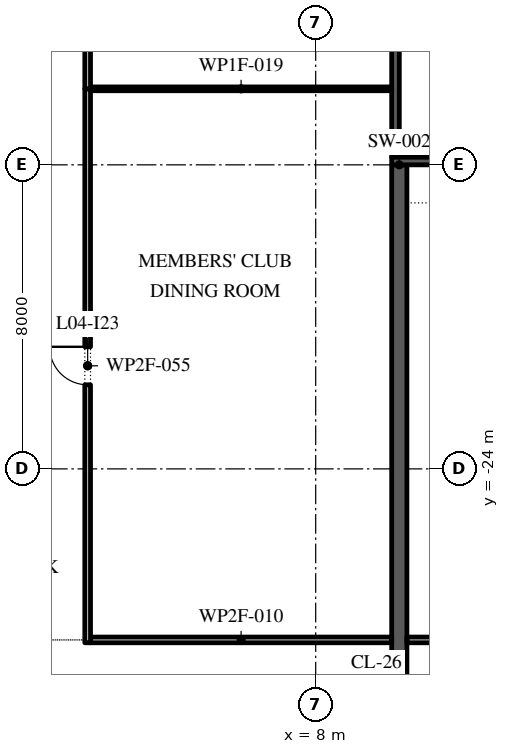
"""IFC4 building model, lengths in metres.
Left out: names, types, materials, properties, quantities, classifications, styles, units other than length and angle.
Written with IfcOpenShell. Run it as: python <this file> out.ifc"""

import sys

from ifc_helpers import new_model, si_unit, direction, frame, frame_2d, origin, place, context, subcontext, project, spatial, rectangle, extrude, element, fill, save


model = new_model("IFC4")
c1 = context("Model", 3, precision=1e-05, world=origin(), true_north=direction((0.0, 1.0)))
c2 = subcontext(c1, "Body", "Model", "MODEL_VIEW")
j1 = project(units=[si_unit("LENGTHUNIT", "METRE"), si_unit("PLANEANGLEUNIT", "RADIAN")], contexts=[c1])
p1 = place(None, origin())
s1 = spatial("IfcSite", under=j1, at=p1, CompositionType="ELEMENT")
p2 = place(p1, origin())
s2 = spatial("IfcBuilding", under=s1, at=p2, CompositionType="ELEMENT")
p3 = place(p2, frame((0.0, 0.0, 24.0)))
s3 = spatial("IfcBuildingStorey", under=s2, at=p3, CompositionType="ELEMENT", Elevation=24.0)
p4 = place(p3, frame((10.2, -31.0, 0.0), z_axis=(0.0, 0.0, 1.0), x_axis=(0.0, 1.0, 0.0)))
e1 = element("IfcWall", 1, at=p4, inside=s3, PredefinedType="SHEAR", context=c2, shape_type="SweptSolid", body=[
    extrude(rectangle(XDim=15.0, YDim=0.4, at=frame_2d((7.5, 0.0))), origin(), (0.0, 0.0, 1.0), 4.5),
])
p5 = place(p3, frame((10.1, -15.8, 0.0), z_axis=(0.0, 0.0, 1.0), x_axis=(0.0, 1.0, 0.0)))
e2 = element("IfcWall", 2, at=p5, inside=s3, PredefinedType="SHEAR", context=c2, shape_type="SweptSolid", body=[
    extrude(rectangle(XDim=13.05, YDim=0.2, at=frame_2d((6.525, 0.0))), origin(), (0.0, 0.0, 1.0), 4.5),
])
p6 = place(p5, frame((4.462, 0.0, 0.0)))
e3 = element("IfcOpeningElement", 3, at=p6, cuts=e2, PredefinedType="OPENING", context=c2, shape_type="SweptSolid", body=[
    extrude(rectangle(XDim=0.9, YDim=2.1, at=frame_2d((0.45, 1.05))), frame((0.0, 0.11, 0.0), z_axis=(0.0, -1.0, 0.0), x_axis=(1.0, 0.0, 0.0)), (0.0, 0.0, 1.0), 0.22),
])
p7 = place(p3, frame((10.0, -15.9, 0.0), z_axis=(0.0, 0.0, 1.0), x_axis=(1.0, 0.0, 0.0)))
e4 = element("IfcWall", 4, at=p7, inside=s3, PredefinedType="SHEAR", context=c2, shape_type="SweptSolid", body=[
    extrude(rectangle(XDim=12.0, YDim=0.2, at=frame_2d((6.0, 0.0))), origin(), (0.0, 0.0, 1.0), 4.5),
])
p8 = place(p3, frame((2.075, -28.5, 0.0), z_axis=(0.0, 0.0, 1.0), x_axis=(1.0, 0.0, 0.0)))
e5 = element("IfcWall", 5, at=p8, inside=s3, PredefinedType="PARTITIONING", context=c2, shape_type="SweptSolid", body=[
    extrude(rectangle(XDim=7.925, YDim=0.15, at=frame_2d((3.962, 0.0))), origin(), (0.0, 0.0, 1.0), 4.5),
])
p9 = place(p3, frame((10.4, -28.5, 0.0), z_axis=(0.0, 0.0, 1.0), x_axis=(1.0, 0.0, 0.0)))
e6 = element("IfcWall", 6, at=p9, inside=s3, PredefinedType="PARTITIONING", context=c2, shape_type="SweptSolid", body=[
    extrude(rectangle(XDim=11.525, YDim=0.15, at=frame_2d((5.763, 0.0))), origin(), (0.0, 0.0, 1.0), 4.5),
])
p10 = place(p3, frame((2.075, -14.0, 0.0), z_axis=(0.0, 0.0, 1.0), x_axis=(1.0, 0.0, 0.0)))
e7 = element("IfcWall", 7, at=p10, inside=s3, PredefinedType="PARTITIONING", context=c2, shape_type="SweptSolid", body=[
    extrude(rectangle(XDim=7.925, YDim=0.1, at=frame_2d((3.962, 0.0))), origin(), (0.0, 0.0, 1.0), 4.5),
])
p11 = place(p3, frame((2.0, -28.575, 0.0), z_axis=(0.0, 0.0, 1.0), x_axis=(0.0, 1.0, 0.0)))
e8 = element("IfcWall", 8, at=p11, inside=s3, PredefinedType="PARTITIONING", context=c2, shape_type="SweptSolid", body=[
    extrude(rectangle(XDim=14.575, YDim=0.15, at=frame_2d((7.288, 0.0))), origin(), (0.0, 0.0, 1.0), 4.5),
])
p12 = place(p11, frame((6.788, 0.0, 0.0)))
e9 = element("IfcOpeningElement", 9, at=p12, cuts=e8, PredefinedType="OPENING", context=c2, shape_type="SweptSolid", body=[
    extrude(rectangle(XDim=1.0, YDim=2.1, at=frame_2d((0.5, 1.05))), frame((0.0, 0.085, 0.0), z_axis=(0.0, -1.0, 0.0), x_axis=(1.0, 0.0, 0.0)), (0.0, 0.0, 1.0), 0.17),
])
p13 = place(p3, frame((2.0, -14.0, 0.0), z_axis=(0.0, 0.0, 1.0), x_axis=(0.0, 1.0, 0.0)))
e10 = element("IfcWall", 10, at=p13, inside=s3, PredefinedType="PARTITIONING", context=c2, shape_type="SweptSolid", body=[
    extrude(rectangle(XDim=9.075, YDim=0.15, at=frame_2d((4.538, 0.0))), origin(), (0.0, 0.0, 1.0), 4.5),
])
p14 = place(p13, frame((4.038, 0.0, 0.0)))
e11 = element("IfcOpeningElement", 11, at=p14, cuts=e10, PredefinedType="OPENING", context=c2, shape_type="SweptSolid", body=[
    extrude(rectangle(XDim=1.0, YDim=2.1, at=frame_2d((0.5, 1.05))), frame((0.0, 0.085, 0.0), z_axis=(0.0, -1.0, 0.0), x_axis=(1.0, 0.0, 0.0)), (0.0, 0.0, 1.0), 0.17),
])
p15 = place(p12, origin())
e12 = element("IfcDoor", 12, at=p15, inside=s3, OperationType="SINGLE_SWING_LEFT", PredefinedType="DOOR", context=c2, shape_type="SweptSolid", body=[
    extrude(rectangle(XDim=1.0, YDim=2.1, at=frame_2d((0.5, 1.05))), frame((0.0, 0.025, 0.0), z_axis=(0.0, -1.0, 0.0), x_axis=(1.0, 0.0, 0.0)), (0.0, 0.0, 1.0), 0.05),
])
fill(e9, e12)
save(model, sys.argv[1])
